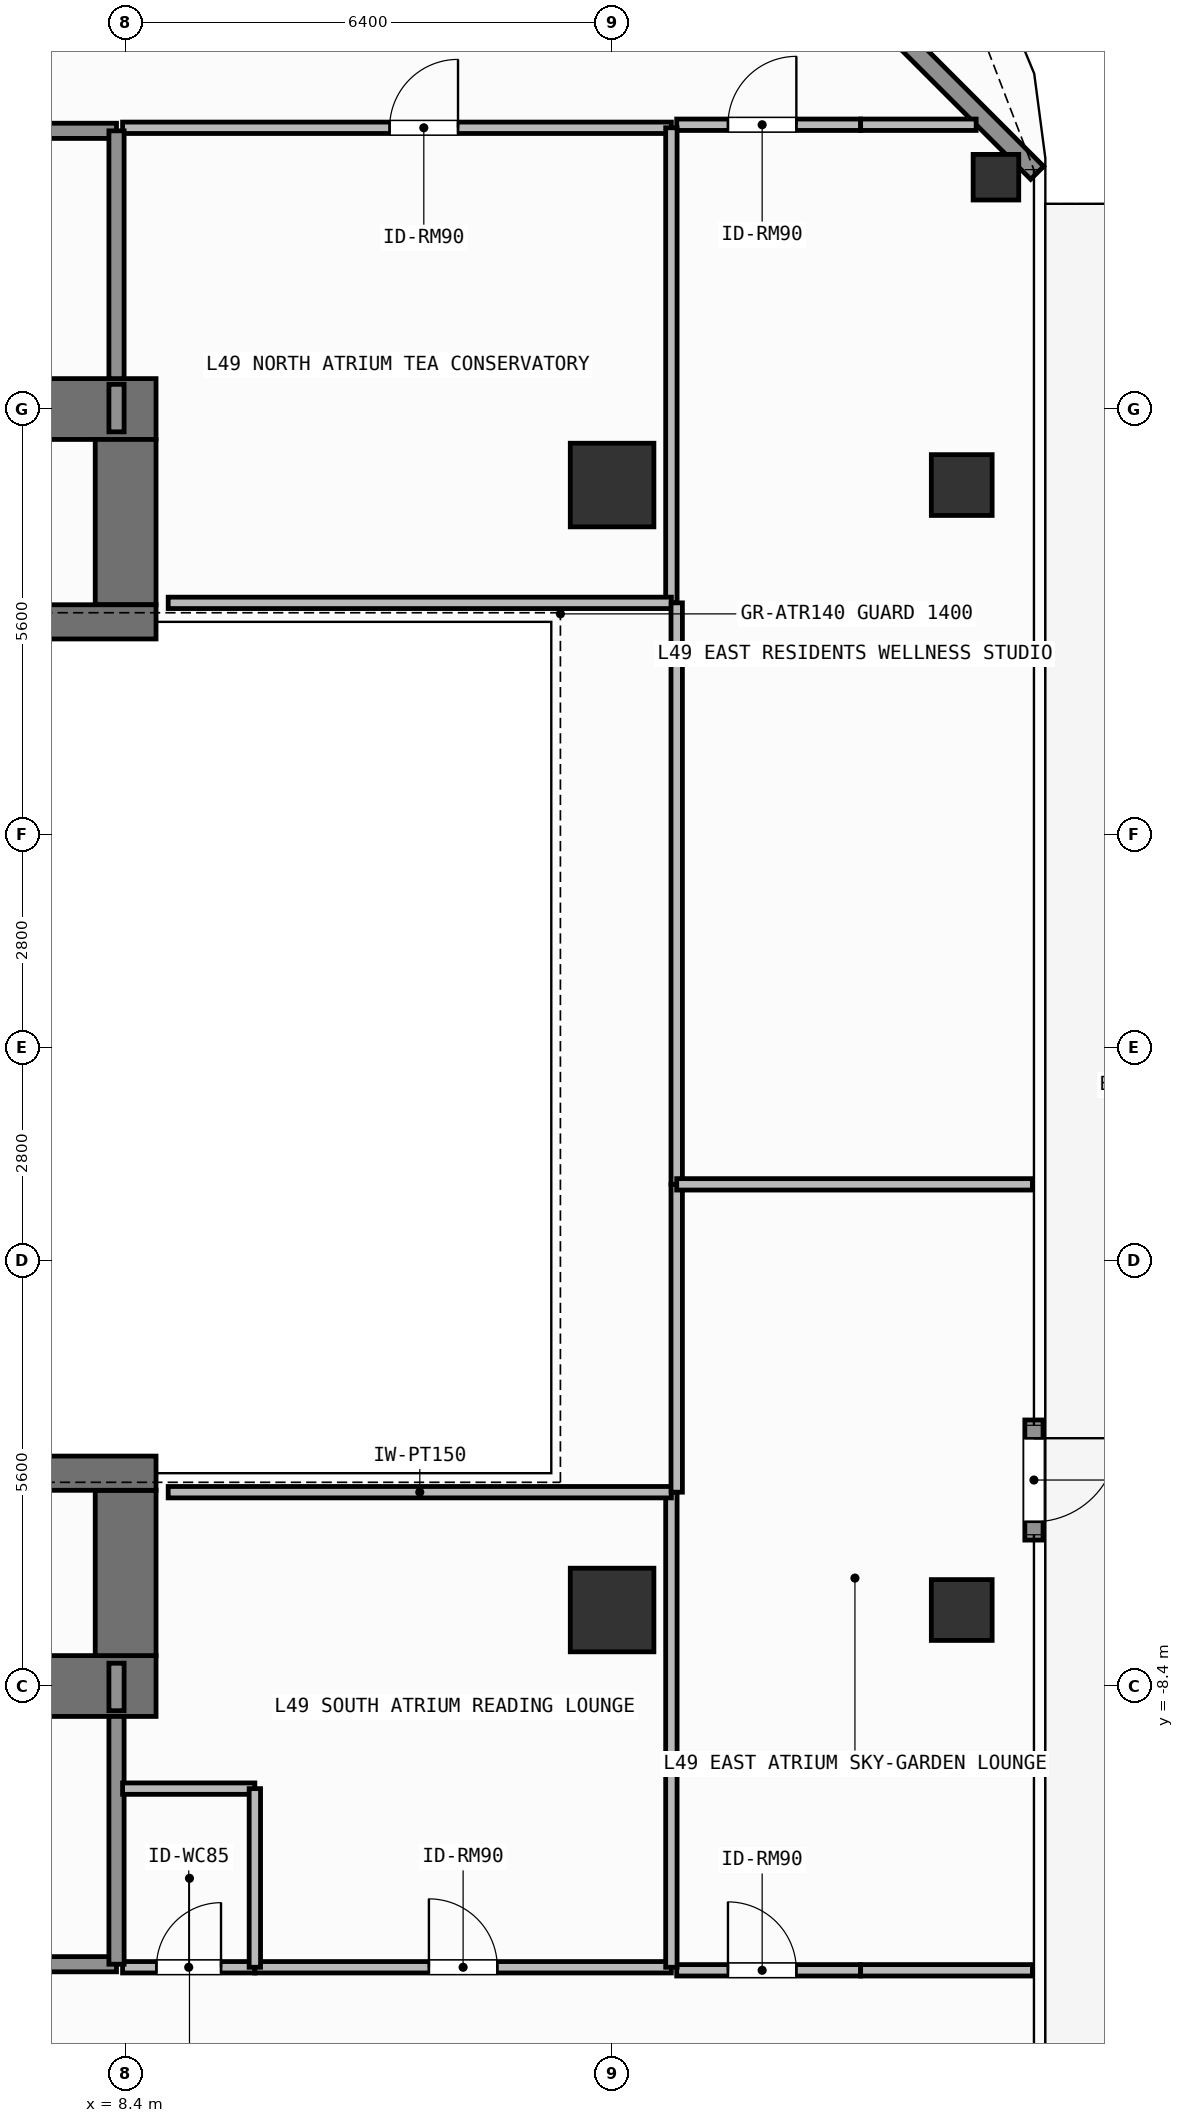
"""IFC4 building model, lengths in metres.
Left out: names, types, materials, properties, quantities, classifications, styles, units other than length and angle.
Written with IfcOpenShell. Run it as: python <this file> out.ifc"""

import sys

from ifc_helpers import new_model, si_unit, direction, frame, frame_2d, origin, origin_2d, place, context, subcontext, project, spatial, rectangle, hollow_rectangle, extrude, element, fill, save


model = new_model("IFC4")
c1 = context("Model", 3, precision=1e-05, world=origin(), true_north=direction((0.0, 1.0)))
c2 = subcontext(c1, "Body", "Model", "MODEL_VIEW")
j1 = project(units=[si_unit("LENGTHUNIT", "METRE"), si_unit("PLANEANGLEUNIT", "RADIAN")], contexts=[c1])
p1 = place(None, origin())
s1 = spatial("IfcSite", under=j1, at=p1, CompositionType="ELEMENT")
p2 = place(p1, origin())
s2 = spatial("IfcBuilding", under=s1, at=p2, CompositionType="ELEMENT")
p3 = place(p2, frame((0.0, 0.0, 199.2)))
s3 = spatial("IfcBuildingStorey", under=s2, at=p3, CompositionType="ELEMENT", Elevation=199.2)
p4 = place(p3, frame((6.12, -8.4, 0.0), z_axis=(0.0, 0.0, 1.0), x_axis=(1.0, 0.0, 0.0)))
e1 = element("IfcWall", 1, at=p4, inside=s3, PredefinedType="SHEAR", context=c2, shape_type="SweptSolid", body=[
    extrude(rectangle(XDim=2.68, YDim=0.8, at=frame_2d((1.34, 0.0))), origin(), (0.0, 0.0, 1.0), 3.9),
])
p5 = place(p3, frame((-7.55, 8.4, 0.0), z_axis=(0.0, 0.0, 1.0), x_axis=(1.0, 0.0, 0.0)))
e2 = element("IfcWall", 2, at=p5, inside=s3, PredefinedType="SHEAR", context=c2, shape_type="SweptSolid", body=[
    extrude(rectangle(XDim=16.35, YDim=0.8, at=frame_2d((8.175, 0.0))), origin(), (0.0, 0.0, 1.0), 3.9),
])
for number, where, z_axis, x_axis in (
    (3, (8.4, -8.0, 0.0), (0.0, 0.0, 1.0), (0.0, 1.0, 0.0)),
    (4, (8.4, 5.825, 0.0), (0.0, 0.0, 1.0), (0.0, 1.0, 0.0)),
):
    element("IfcWall", number, at=place(p3, frame(where, z_axis=z_axis, x_axis=x_axis)), inside=s3, PredefinedType="SHEAR", context=c2, shape_type="SweptSolid", body=[
        extrude(rectangle(XDim=2.175, YDim=0.8, at=frame_2d((1.087, 0.0))), origin(), (0.0, 0.0, 1.0), 3.9),
    ])
for number, where, z_axis, x_axis in (
    (5, (3.045, -5.6, 0.0), (0.0, 0.0, 1.0), (1.0, 0.0, 0.0)),
    (6, (3.045, 5.6, 0.0), (0.0, 0.0, 1.0), (1.0, 0.0, 0.0)),
):
    element("IfcWall", number, at=place(p3, frame(where, z_axis=z_axis, x_axis=x_axis)), inside=s3, PredefinedType="SHEAR", context=c2, shape_type="SweptSolid", body=[
        extrude(rectangle(XDim=5.755, YDim=0.45, at=frame_2d((2.877, 0.0))), origin(), (0.0, 0.0, 1.0), 3.9),
    ])
for number, where, z_axis, x_axis in (
    (7, (14.8, -7.4, 0.0), (0.0, 0.0, 1.0), (1.0, 0.0, 0.0)),
    (8, (14.8, 7.4, 0.0), (0.0, 0.0, 1.0), (1.0, 0.0, 0.0)),
):
    element("IfcColumn", number, at=place(p3, frame(where, z_axis=z_axis, x_axis=x_axis)), inside=s3, PredefinedType="COLUMN", context=c2, shape_type="SweptSolid", body=[
        extrude(rectangle(XDim=1.1, YDim=1.1, at=origin_2d()), origin(), (0.0, 0.0, 1.0), 3.9),
    ])
for number, where, z_axis, x_axis in (
    (9, (19.4, -7.4, 0.0), (0.0, 0.0, 1.0), (1.0, 0.0, 0.0)),
    (10, (19.4, 7.4, 0.0), (0.0, 0.0, 1.0), (1.0, 0.0, 0.0)),
):
    element("IfcColumn", number, at=place(p3, frame(where, z_axis=z_axis, x_axis=x_axis)), inside=s3, PredefinedType="COLUMN", context=c2, shape_type="SweptSolid", body=[
        extrude(hollow_rectangle(XDim=0.8, YDim=0.8, WallThickness=0.036, at=origin_2d()), origin(), (0.0, 0.0, 1.0), 3.9),
    ])
p6 = place(p3, frame((19.85, 11.45, 0.0), z_axis=(0.0, 0.0, 1.0), x_axis=(1.0, 0.0, 0.0)))
e11 = element("IfcColumn", 11, at=p6, inside=s3, PredefinedType="COLUMN", context=c2, shape_type="SweptSolid", body=[
    extrude(hollow_rectangle(XDim=0.6, YDim=0.6, WallThickness=0.028, at=origin_2d()), origin(), (0.0, 0.0, 1.0), 3.9),
])
p7 = place(p3, frame((20.35, -4.9, 0.0), z_axis=(0.0, 0.0, 1.0), x_axis=(0.0, -1.0, 0.0)))
e12 = element("IfcWall", 12, at=p7, inside=s3, PredefinedType="SOLIDWALL", context=c2, shape_type="SweptSolid", body=[
    extrude(rectangle(XDim=1.58, YDim=0.24, at=frame_2d((0.79, 0.0))), origin(), (0.0, 0.0, 1.0), 3.68),
])
p8 = place(p7, frame((0.24, 0.0, 0.0)))
e13 = element("IfcOpeningElement", 13, at=p8, cuts=e12, PredefinedType="OPENING", context=c2, shape_type="SweptSolid", body=[
    extrude(rectangle(XDim=1.1, YDim=2.2, at=frame_2d((0.55, 1.1))), frame((0.0, 0.13, 0.0), z_axis=(0.0, -1.0, 0.0), x_axis=(1.0, 0.0, 0.0)), (0.0, 0.0, 1.0), 0.26),
])
p9 = place(p3, frame((16.008, 15.892, 0.0), z_axis=(0.0, 0.0, 1.0), x_axis=(0.707106781187, -0.707106781187, 0.0)))
e14 = element("IfcWall", 14, at=p9, inside=s3, PredefinedType="SOLIDWALL", context=c2, shape_type="SweptSolid", body=[
    extrude(rectangle(XDim=6.201, YDim=0.24, at=frame_2d((3.101, 0.0))), origin(), (0.0, 0.0, 1.0), 3.68),
])
p10 = place(p3, frame((4.58, -12.06, 0.0), z_axis=(0.0, 0.0, 1.0), x_axis=(1.0, 0.0, 0.0)))
e15 = element("IfcWall", 15, at=p10, inside=s3, PredefinedType="SOLIDWALL", context=c2, shape_type="SweptSolid", body=[
    extrude(rectangle(XDim=3.7, YDim=0.2, at=frame_2d((1.85, 0.0))), origin(), (0.0, 0.0, 1.0), 3.68),
])
p11 = place(p10, frame((1.212, 0.0, 0.0)))
e16 = element("IfcOpeningElement", 16, at=p11, cuts=e15, PredefinedType="OPENING", context=c2, shape_type="SweptSolid", body=[
    extrude(rectangle(XDim=1.1, YDim=2.15, at=frame_2d((0.55, 1.075))), frame((0.0, 0.11, 0.0), z_axis=(0.0, -1.0, 0.0), x_axis=(1.0, 0.0, 0.0)), (0.0, 0.0, 1.0), 0.22),
])
p12 = place(p3, frame((4.58, 12.06, 0.0), z_axis=(0.0, 0.0, 1.0), x_axis=(1.0, 0.0, 0.0)))
e17 = element("IfcWall", 17, at=p12, inside=s3, PredefinedType="SOLIDWALL", context=c2, shape_type="SweptSolid", body=[
    extrude(rectangle(XDim=3.7, YDim=0.2, at=frame_2d((1.85, 0.0))), origin(), (0.0, 0.0, 1.0), 3.68),
])
p13 = place(p12, frame((1.212, 0.0, 0.0)))
e18 = element("IfcOpeningElement", 18, at=p13, cuts=e17, PredefinedType="OPENING", context=c2, shape_type="SweptSolid", body=[
    extrude(rectangle(XDim=1.1, YDim=2.15, at=frame_2d((0.55, 1.075))), frame((0.0, 0.11, 0.0), z_axis=(0.0, -1.0, 0.0), x_axis=(1.0, 0.0, 0.0)), (0.0, 0.0, 1.0), 0.22),
])
p14 = place(p3, frame((8.36, -12.1, 0.0), z_axis=(0.0, 0.0, 1.0), x_axis=(1.0, 0.0, 0.0)))
e19 = element("IfcWall", 19, at=p14, inside=s3, PredefinedType="PARTITIONING", context=c2, shape_type="SweptSolid", body=[
    extrude(rectangle(XDim=1.74, YDim=0.15, at=frame_2d((0.87, 0.0))), origin(), (0.0, 0.0, 1.0), 3.68),
])
p15 = place(p14, frame((0.445, 0.0, 0.0)))
e20 = element("IfcOpeningElement", 20, at=p15, cuts=e19, PredefinedType="OPENING", context=c2, shape_type="SweptSolid", body=[
    extrude(rectangle(XDim=0.85, YDim=2.1, at=frame_2d((0.425, 1.05))), frame((0.0, 0.085, 0.0), z_axis=(0.0, -1.0, 0.0), x_axis=(1.0, 0.0, 0.0)), (0.0, 0.0, 1.0), 0.17),
])
p16 = place(p3, frame((10.1, -12.1, 0.0), z_axis=(0.0, 0.0, 1.0), x_axis=(1.0, 0.0, 0.0)))
e21 = element("IfcWall", 21, at=p16, inside=s3, PredefinedType="PARTITIONING", context=c2, shape_type="SweptSolid", body=[
    extrude(rectangle(XDim=5.48, YDim=0.15, at=frame_2d((2.74, 0.0))), origin(), (0.0, 0.0, 1.0), 3.68),
])
p17 = place(p16, frame((2.29, 0.0, 0.0)))
e22 = element("IfcOpeningElement", 22, at=p17, cuts=e21, PredefinedType="OPENING", context=c2, shape_type="SweptSolid", body=[
    extrude(rectangle(XDim=0.9, YDim=2.1, at=frame_2d((0.45, 1.05))), frame((0.0, 0.085, 0.0), z_axis=(0.0, -1.0, 0.0), x_axis=(1.0, 0.0, 0.0)), (0.0, 0.0, 1.0), 0.17),
])
p18 = place(p3, frame((8.36, 12.1, 0.0), z_axis=(0.0, 0.0, 1.0), x_axis=(1.0, 0.0, 0.0)))
e23 = element("IfcWall", 23, at=p18, inside=s3, PredefinedType="PARTITIONING", context=c2, shape_type="SweptSolid", body=[
    extrude(rectangle(XDim=7.22, YDim=0.15, at=frame_2d((3.61, 0.0))), origin(), (0.0, 0.0, 1.0), 3.68),
])
p19 = place(p18, frame((3.513, 0.0, 0.0)))
e24 = element("IfcOpeningElement", 24, at=p19, cuts=e23, PredefinedType="OPENING", context=c2, shape_type="SweptSolid", body=[
    extrude(rectangle(XDim=0.9, YDim=2.1, at=frame_2d((0.45, 1.05))), frame((0.0, 0.085, 0.0), z_axis=(0.0, -1.0, 0.0), x_axis=(1.0, 0.0, 0.0)), (0.0, 0.0, 1.0), 0.17),
])
p20 = place(p3, frame((15.65, -12.14, 0.0), z_axis=(0.0, 0.0, 1.0), x_axis=(1.0, 0.0, 0.0)))
e25 = element("IfcWall", 25, at=p20, inside=s3, PredefinedType="PARTITIONING", context=c2, shape_type="SweptSolid", body=[
    extrude(rectangle(XDim=2.42, YDim=0.15, at=frame_2d((1.21, 0.0))), origin(), (0.0, 0.0, 1.0), 3.68),
])
p21 = place(p20, frame((0.674, 0.0, 0.0)))
e26 = element("IfcOpeningElement", 26, at=p21, cuts=e25, PredefinedType="OPENING", context=c2, shape_type="SweptSolid", body=[
    extrude(rectangle(XDim=0.9, YDim=2.1, at=frame_2d((0.45, 1.05))), frame((0.0, 0.085, 0.0), z_axis=(0.0, -1.0, 0.0), x_axis=(1.0, 0.0, 0.0)), (0.0, 0.0, 1.0), 0.17),
])
p22 = place(p3, frame((15.65, 12.14, 0.0), z_axis=(0.0, 0.0, 1.0), x_axis=(1.0, 0.0, 0.0)))
e27 = element("IfcWall", 27, at=p22, inside=s3, PredefinedType="PARTITIONING", context=c2, shape_type="SweptSolid", body=[
    extrude(rectangle(XDim=2.42, YDim=0.15, at=frame_2d((1.21, 0.0))), origin(), (0.0, 0.0, 1.0), 3.68),
])
p23 = place(p22, frame((0.674, 0.0, 0.0)))
e28 = element("IfcOpeningElement", 28, at=p23, cuts=e27, PredefinedType="OPENING", context=c2, shape_type="SweptSolid", body=[
    extrude(rectangle(XDim=0.9, YDim=2.1, at=frame_2d((0.45, 1.05))), frame((0.0, 0.085, 0.0), z_axis=(0.0, -1.0, 0.0), x_axis=(1.0, 0.0, 0.0)), (0.0, 0.0, 1.0), 0.17),
])
for number, where, z_axis, x_axis in (
    (29, (8.28, -12.06, 0.0), (0.0, 0.0, 1.0), (0.0, 1.0, 0.0)),
    (30, (8.28, 8.8, 0.0), (0.0, 0.0, 1.0), (0.0, 1.0, 0.0)),
):
    element("IfcWall", number, at=place(p3, frame(where, z_axis=z_axis, x_axis=x_axis)), inside=s3, PredefinedType="SOLIDWALL", context=c2, shape_type="SweptSolid", body=[
        extrude(rectangle(XDim=3.26, YDim=0.2, at=frame_2d((1.63, 0.0))), origin(), (0.0, 0.0, 1.0), 3.68),
    ])
p24 = place(p3, frame((8.28, -8.725, 0.0), z_axis=(0.0, 0.0, 1.0), x_axis=(0.0, 1.0, 0.0)))
e31 = element("IfcWall", 31, at=p24, inside=s3, PredefinedType="SOLIDWALL", context=c2, shape_type="SweptSolid", body=[
    extrude(rectangle(XDim=0.625, YDim=0.2, at=frame_2d((0.312, 0.0))), origin(), (0.0, 0.0, 1.0), 3.68),
])
p25 = place(p3, frame((8.36, -9.75, 0.0), z_axis=(0.0, 0.0, 1.0), x_axis=(1.0, 0.0, 0.0)))
e32 = element("IfcWall", 32, at=p25, inside=s3, PredefinedType="PARTITIONING", context=c2, shape_type="SweptSolid", body=[
    extrude(rectangle(XDim=1.74, YDim=0.15, at=frame_2d((0.87, 0.0))), origin(), (0.0, 0.0, 1.0), 3.68),
])
p26 = place(p3, frame((10.1, -12.1, 0.0), z_axis=(0.0, 0.0, 1.0), x_axis=(0.0, 1.0, 0.0)))
e33 = element("IfcWall", 33, at=p26, inside=s3, PredefinedType="PARTITIONING", context=c2, shape_type="SweptSolid", body=[
    extrude(rectangle(XDim=2.35, YDim=0.15, at=frame_2d((1.175, 0.0))), origin(), (0.0, 0.0, 1.0), 3.68),
])
p27 = place(p3, frame((15.58, -12.1, 0.0), z_axis=(0.0, 0.0, 1.0), x_axis=(0.0, 1.0, 0.0)))
e34 = element("IfcWall", 34, at=p27, inside=s3, PredefinedType="PARTITIONING", context=c2, shape_type="SweptSolid", body=[
    extrude(rectangle(XDim=6.25, YDim=0.15, at=frame_2d((3.125, 0.0))), origin(), (0.0, 0.0, 1.0), 3.68),
])
p28 = place(p3, frame((8.96, -5.85, 0.0), z_axis=(0.0, 0.0, 1.0), x_axis=(1.0, 0.0, 0.0)))
e35 = element("IfcWall", 35, at=p28, inside=s3, PredefinedType="PARTITIONING", context=c2, shape_type="SweptSolid", body=[
    extrude(rectangle(XDim=6.62, YDim=0.15, at=frame_2d((3.31, 0.0))), origin(), (0.0, 0.0, 1.0), 3.68),
])
p29 = place(p3, frame((8.28, 8.1, 0.0), z_axis=(0.0, 0.0, 1.0), x_axis=(0.0, 1.0, 0.0)))
e36 = element("IfcWall", 36, at=p29, inside=s3, PredefinedType="SOLIDWALL", context=c2, shape_type="SweptSolid", body=[
    extrude(rectangle(XDim=0.625, YDim=0.2, at=frame_2d((0.312, 0.0))), origin(), (0.0, 0.0, 1.0), 3.68),
])
p30 = place(p3, frame((15.58, 5.85, 0.0), z_axis=(0.0, 0.0, 1.0), x_axis=(0.0, 1.0, 0.0)))
e37 = element("IfcWall", 37, at=p30, inside=s3, PredefinedType="PARTITIONING", context=c2, shape_type="SweptSolid", body=[
    extrude(rectangle(XDim=6.25, YDim=0.15, at=frame_2d((3.125, 0.0))), origin(), (0.0, 0.0, 1.0), 3.68),
])
p31 = place(p3, frame((8.96, 5.85, 0.0), z_axis=(0.0, 0.0, 1.0), x_axis=(1.0, 0.0, 0.0)))
e38 = element("IfcWall", 38, at=p31, inside=s3, PredefinedType="PARTITIONING", context=c2, shape_type="SweptSolid", body=[
    extrude(rectangle(XDim=6.62, YDim=0.15, at=frame_2d((3.31, 0.0))), origin(), (0.0, 0.0, 1.0), 3.68),
])
p32 = place(p3, frame((15.65, -5.85, 0.0), z_axis=(0.0, 0.0, 1.0), x_axis=(0.0, 1.0, 0.0)))
e39 = element("IfcWall", 39, at=p32, inside=s3, PredefinedType="PARTITIONING", context=c2, shape_type="SweptSolid", body=[
    extrude(rectangle(XDim=4.05, YDim=0.15, at=frame_2d((2.025, 0.0))), origin(), (0.0, 0.0, 1.0), 3.68),
])
p33 = place(p3, frame((15.65, -1.8, 0.0), z_axis=(0.0, 0.0, 1.0), x_axis=(0.0, 1.0, 0.0)))
e40 = element("IfcWall", 40, at=p33, inside=s3, PredefinedType="PARTITIONING", context=c2, shape_type="SweptSolid", body=[
    extrude(rectangle(XDim=7.65, YDim=0.15, at=frame_2d((3.825, 0.0))), origin(), (0.0, 0.0, 1.0), 3.68),
])
p34 = place(p3, frame((15.65, -1.8, 0.0), z_axis=(0.0, 0.0, 1.0), x_axis=(1.0, 0.0, 0.0)))
e41 = element("IfcWall", 41, at=p34, inside=s3, PredefinedType="PARTITIONING", context=c2, shape_type="SweptSolid", body=[
    extrude(rectangle(XDim=4.68, YDim=0.15, at=frame_2d((2.34, 0.0))), origin(), (0.0, 0.0, 1.0), 3.68),
])
p35 = place(p3, frame((18.07, -12.14, 0.0), z_axis=(0.0, 0.0, 1.0), x_axis=(1.0, 0.0, 0.0)))
e42 = element("IfcWall", 42, at=p35, inside=s3, PredefinedType="PARTITIONING", context=c2, shape_type="SweptSolid", body=[
    extrude(rectangle(XDim=2.26, YDim=0.15, at=frame_2d((1.13, 0.0))), origin(), (0.0, 0.0, 1.0), 3.68),
])
p36 = place(p3, frame((18.07, 12.14, 0.0), z_axis=(0.0, 0.0, 1.0), x_axis=(1.0, 0.0, 0.0)))
e43 = element("IfcWall", 43, at=p36, inside=s3, PredefinedType="PARTITIONING", context=c2, shape_type="SweptSolid", body=[
    extrude(rectangle(XDim=1.52, YDim=0.15, at=frame_2d((0.76, 0.0))), origin(), (0.0, 0.0, 1.0), 3.68),
])
p37 = place(p8, origin())
e44 = element("IfcDoor", 44, at=p37, inside=s3, OperationType="SINGLE_SWING_LEFT", PredefinedType="DOOR", context=c2, shape_type="SweptSolid", body=[
    extrude(rectangle(XDim=1.1, YDim=2.2, at=frame_2d((0.55, 1.1))), frame((0.0, 0.025, 0.0), z_axis=(0.0, -1.0, 0.0), x_axis=(1.0, 0.0, 0.0)), (0.0, 0.0, 1.0), 0.05),
])
fill(e13, e44)
p38 = place(p15, origin())
e45 = element("IfcDoor", 45, at=p38, inside=s3, OperationType="SINGLE_SWING_RIGHT", PredefinedType="DOOR", context=c2, shape_type="SweptSolid", body=[
    extrude(rectangle(XDim=0.85, YDim=2.1, at=frame_2d((0.425, 1.05))), frame((0.0, 0.025, 0.0), z_axis=(0.0, -1.0, 0.0), x_axis=(1.0, 0.0, 0.0)), (0.0, 0.0, 1.0), 0.05),
])
fill(e20, e45)
p39 = place(p17, origin())
e46 = element("IfcDoor", 46, at=p39, inside=s3, OperationType="SINGLE_SWING_LEFT", PredefinedType="DOOR", context=c2, shape_type="SweptSolid", body=[
    extrude(rectangle(XDim=0.9, YDim=2.1, at=frame_2d((0.45, 1.05))), frame((0.0, 0.025, 0.0), z_axis=(0.0, -1.0, 0.0), x_axis=(1.0, 0.0, 0.0)), (0.0, 0.0, 1.0), 0.05),
])
fill(e22, e46)
p40 = place(p19, origin())
e47 = element("IfcDoor", 47, at=p40, inside=s3, OperationType="SINGLE_SWING_RIGHT", PredefinedType="DOOR", context=c2, shape_type="SweptSolid", body=[
    extrude(rectangle(XDim=0.9, YDim=2.1, at=frame_2d((0.45, 1.05))), frame((0.0, 0.025, 0.0), z_axis=(0.0, -1.0, 0.0), x_axis=(1.0, 0.0, 0.0)), (0.0, 0.0, 1.0), 0.05),
])
fill(e24, e47)
p41 = place(p21, origin())
e48 = element("IfcDoor", 48, at=p41, inside=s3, OperationType="SINGLE_SWING_LEFT", PredefinedType="DOOR", context=c2, shape_type="SweptSolid", body=[
    extrude(rectangle(XDim=0.9, YDim=2.1, at=frame_2d((0.45, 1.05))), frame((0.0, 0.025, 0.0), z_axis=(0.0, -1.0, 0.0), x_axis=(1.0, 0.0, 0.0)), (0.0, 0.0, 1.0), 0.05),
])
fill(e26, e48)
p42 = place(p23, origin())
e49 = element("IfcDoor", 49, at=p42, inside=s3, OperationType="SINGLE_SWING_RIGHT", PredefinedType="DOOR", context=c2, shape_type="SweptSolid", body=[
    extrude(rectangle(XDim=0.9, YDim=2.1, at=frame_2d((0.45, 1.05))), frame((0.0, 0.025, 0.0), z_axis=(0.0, -1.0, 0.0), x_axis=(1.0, 0.0, 0.0)), (0.0, 0.0, 1.0), 0.05),
])
fill(e28, e49)
save(model, sys.argv[1])
